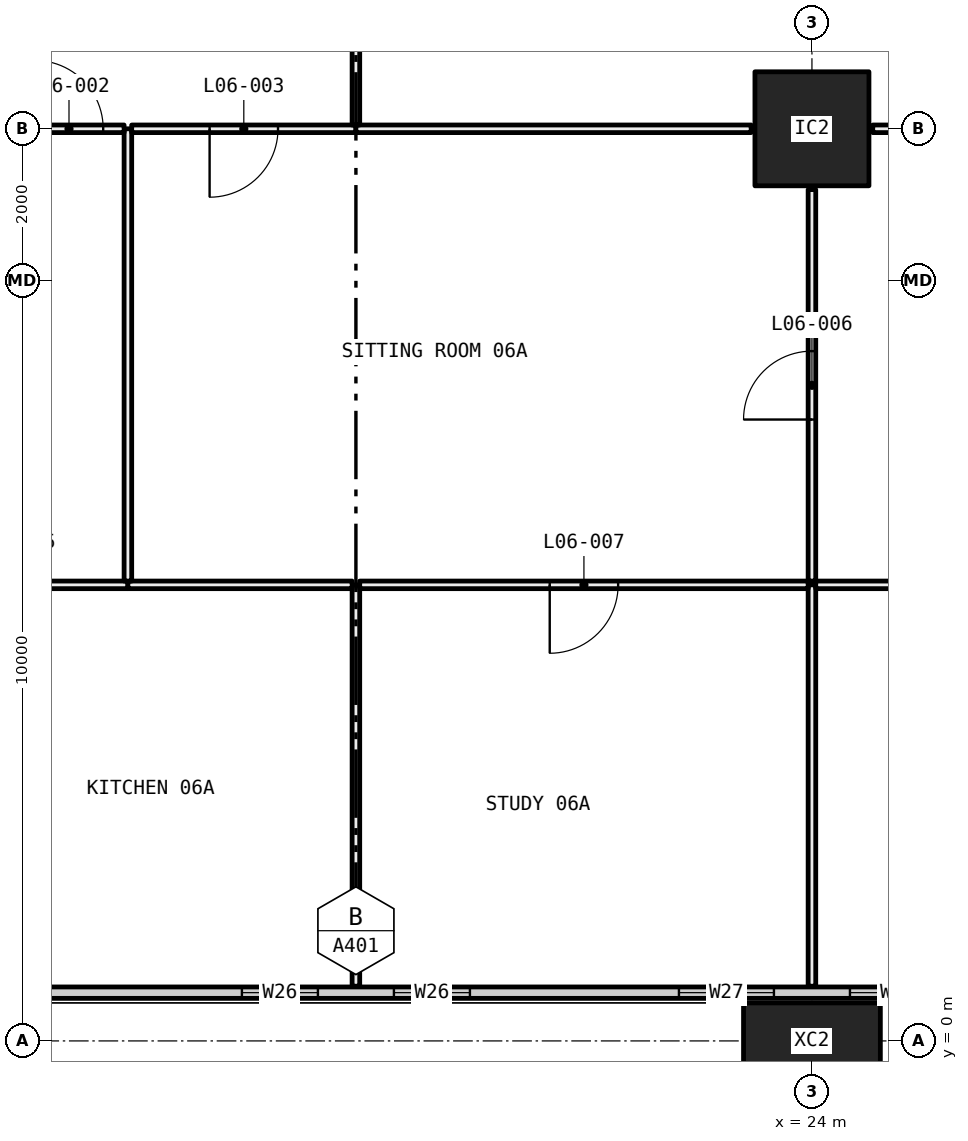
"""IFC4 building model, lengths in metres.
Left out: names, types, materials, properties, quantities, classifications, styles, units other than length and angle.
Written with IfcOpenShell. Run it as: python <this file> out.ifc"""

import sys

from ifc_helpers import new_model, si_unit, direction, frame, frame_2d, origin, origin_2d, place, context, subcontext, project, spatial, rectangle, hollow_rectangle, extrude, element, fill, save


model = new_model("IFC4")
c1 = context("Model", 3, precision=1e-05, world=origin(), true_north=direction((0.0, 1.0)))
c2 = subcontext(c1, "Body", "Model", "MODEL_VIEW")
j1 = project(units=[si_unit("LENGTHUNIT", "METRE"), si_unit("PLANEANGLEUNIT", "RADIAN")], contexts=[c1])
p1 = place(None, origin())
s1 = spatial("IfcSite", under=j1, at=p1, CompositionType="ELEMENT")
p2 = place(p1, origin())
s2 = spatial("IfcBuilding", under=s1, at=p2, CompositionType="ELEMENT")
p3 = place(p2, frame((0.0, 0.0, 33.45)))
s3 = spatial("IfcBuildingStorey", under=s2, at=p3, CompositionType="ELEMENT", Elevation=33.45)
p4 = place(p3, frame((24.0, 0.0, -0.4), z_axis=(0.0, 0.0, 1.0), x_axis=(1.0, 0.0, 0.0)))
e1 = element("IfcColumn", 1, at=p4, inside=s3, PredefinedType="COLUMN", context=c2, shape_type="SweptSolid", body=[
    extrude(hollow_rectangle(XDim=1.8, YDim=1.0, WallThickness=0.07, at=origin_2d()), origin(), (0.0, 0.0, 1.0), 3.45),
])
p5 = place(p3, frame((24.0, 12.0, 0.0), z_axis=(0.0, 0.0, 1.0), x_axis=(1.0, 0.0, 0.0)))
e2 = element("IfcColumn", 2, at=p5, inside=s3, PredefinedType="COLUMN", context=c2, shape_type="SweptSolid", body=[
    extrude(hollow_rectangle(XDim=1.5, YDim=1.5, WallThickness=0.065, at=origin_2d()), origin(), (0.0, 0.0, 1.0), 3.05),
])
p6 = place(p3, frame((6.56, 0.635, 0.0), z_axis=(0.0, 0.0, 1.0), x_axis=(1.0, 0.0, 0.0)))
e3 = element("IfcWall", 3, at=p6, inside=s3, PredefinedType="ELEMENTEDWALL", context=c2, shape_type="SweptSolid", body=[
    extrude(rectangle(XDim=58.88, YDim=0.15, at=frame_2d((29.44, 0.0))), origin(), (0.0, 0.0, 1.0), 3.05),
])
p7 = place(p6, frame((0.44, 0.0, 0.45)))
e4 = element("IfcOpeningElement", 4, at=p7, cuts=e3, PredefinedType="OPENING", context=c2, shape_type="SweptSolid", body=[
    extrude(rectangle(XDim=4.5, YDim=2.55, at=frame_2d((2.25, 1.275))), frame((0.0, 0.085, 0.0), z_axis=(0.0, -1.0, 0.0), x_axis=(1.0, 0.0, 0.0)), (0.0, 0.0, 1.0), 0.17),
])
p8 = place(p6, frame((5.94, 0.0, 0.45)))
e5 = element("IfcOpeningElement", 5, at=p8, cuts=e3, PredefinedType="OPENING", context=c2, shape_type="SweptSolid", body=[
    extrude(rectangle(XDim=1.25, YDim=2.55, at=frame_2d((0.625, 1.275))), frame((0.0, 0.085, 0.0), z_axis=(0.0, -1.0, 0.0), x_axis=(1.0, 0.0, 0.0)), (0.0, 0.0, 1.0), 0.17),
])
p9 = place(p6, frame((9.94, 0.0, 0.45)))
e6 = element("IfcOpeningElement", 6, at=p9, cuts=e3, PredefinedType="OPENING", context=c2, shape_type="SweptSolid", body=[
    extrude(rectangle(XDim=1.0, YDim=2.55, at=frame_2d((0.5, 1.275))), frame((0.0, 0.085, 0.0), z_axis=(0.0, -1.0, 0.0), x_axis=(1.0, 0.0, 0.0)), (0.0, 0.0, 1.0), 0.17),
])
p10 = place(p6, frame((11.94, 0.0, 0.45)))
e7 = element("IfcOpeningElement", 7, at=p10, cuts=e3, PredefinedType="OPENING", context=c2, shape_type="SweptSolid", body=[
    extrude(rectangle(XDim=1.0, YDim=2.55, at=frame_2d((0.5, 1.275))), frame((0.0, 0.085, 0.0), z_axis=(0.0, -1.0, 0.0), x_axis=(1.0, 0.0, 0.0)), (0.0, 0.0, 1.0), 0.17),
])
p11 = place(p6, frame((15.69, 0.0, 0.45)))
e8 = element("IfcOpeningElement", 8, at=p11, cuts=e3, PredefinedType="OPENING", context=c2, shape_type="SweptSolid", body=[
    extrude(rectangle(XDim=1.25, YDim=2.55, at=frame_2d((0.625, 1.275))), frame((0.0, 0.085, 0.0), z_axis=(0.0, -1.0, 0.0), x_axis=(1.0, 0.0, 0.0)), (0.0, 0.0, 1.0), 0.17),
])
p12 = place(p6, frame((17.94, 0.0, 0.45)))
e9 = element("IfcOpeningElement", 9, at=p12, cuts=e3, PredefinedType="OPENING", context=c2, shape_type="SweptSolid", body=[
    extrude(rectangle(XDim=1.25, YDim=2.55, at=frame_2d((0.625, 1.275))), frame((0.0, 0.085, 0.0), z_axis=(0.0, -1.0, 0.0), x_axis=(1.0, 0.0, 0.0)), (0.0, 0.0, 1.0), 0.17),
])
p13 = place(p6, frame((21.94, 0.0, 0.45)))
e10 = element("IfcOpeningElement", 10, at=p13, cuts=e3, PredefinedType="OPENING", context=c2, shape_type="SweptSolid", body=[
    extrude(rectangle(XDim=1.0, YDim=2.55, at=frame_2d((0.5, 1.275))), frame((0.0, 0.085, 0.0), z_axis=(0.0, -1.0, 0.0), x_axis=(1.0, 0.0, 0.0)), (0.0, 0.0, 1.0), 0.17),
])
p14 = place(p6, frame((23.94, 0.0, 0.45)))
e11 = element("IfcOpeningElement", 11, at=p14, cuts=e3, PredefinedType="OPENING", context=c2, shape_type="SweptSolid", body=[
    extrude(rectangle(XDim=1.0, YDim=2.55, at=frame_2d((0.5, 1.275))), frame((0.0, 0.085, 0.0), z_axis=(0.0, -1.0, 0.0), x_axis=(1.0, 0.0, 0.0)), (0.0, 0.0, 1.0), 0.17),
])
p15 = place(p6, frame((27.69, 0.0, 0.45)))
e12 = element("IfcOpeningElement", 12, at=p15, cuts=e3, PredefinedType="OPENING", context=c2, shape_type="SweptSolid", body=[
    extrude(rectangle(XDim=1.25, YDim=2.55, at=frame_2d((0.625, 1.275))), frame((0.0, 0.085, 0.0), z_axis=(0.0, -1.0, 0.0), x_axis=(1.0, 0.0, 0.0)), (0.0, 0.0, 1.0), 0.17),
])
p16 = place(p6, frame((29.94, 0.0, 0.45)))
e13 = element("IfcOpeningElement", 13, at=p16, cuts=e3, PredefinedType="OPENING", context=c2, shape_type="SweptSolid", body=[
    extrude(rectangle(XDim=1.25, YDim=2.55, at=frame_2d((0.625, 1.275))), frame((0.0, 0.085, 0.0), z_axis=(0.0, -1.0, 0.0), x_axis=(1.0, 0.0, 0.0)), (0.0, 0.0, 1.0), 0.17),
])
p17 = place(p6, frame((33.94, 0.0, 0.45)))
e14 = element("IfcOpeningElement", 14, at=p17, cuts=e3, PredefinedType="OPENING", context=c2, shape_type="SweptSolid", body=[
    extrude(rectangle(XDim=1.0, YDim=2.55, at=frame_2d((0.5, 1.275))), frame((0.0, 0.085, 0.0), z_axis=(0.0, -1.0, 0.0), x_axis=(1.0, 0.0, 0.0)), (0.0, 0.0, 1.0), 0.17),
])
p18 = place(p6, frame((35.94, 0.0, 0.45)))
e15 = element("IfcOpeningElement", 15, at=p18, cuts=e3, PredefinedType="OPENING", context=c2, shape_type="SweptSolid", body=[
    extrude(rectangle(XDim=1.0, YDim=2.55, at=frame_2d((0.5, 1.275))), frame((0.0, 0.085, 0.0), z_axis=(0.0, -1.0, 0.0), x_axis=(1.0, 0.0, 0.0)), (0.0, 0.0, 1.0), 0.17),
])
p19 = place(p6, frame((39.69, 0.0, 0.45)))
e16 = element("IfcOpeningElement", 16, at=p19, cuts=e3, PredefinedType="OPENING", context=c2, shape_type="SweptSolid", body=[
    extrude(rectangle(XDim=1.25, YDim=2.55, at=frame_2d((0.625, 1.275))), frame((0.0, 0.085, 0.0), z_axis=(0.0, -1.0, 0.0), x_axis=(1.0, 0.0, 0.0)), (0.0, 0.0, 1.0), 0.17),
])
p20 = place(p6, frame((41.94, 0.0, 0.45)))
e17 = element("IfcOpeningElement", 17, at=p20, cuts=e3, PredefinedType="OPENING", context=c2, shape_type="SweptSolid", body=[
    extrude(rectangle(XDim=1.25, YDim=2.55, at=frame_2d((0.625, 1.275))), frame((0.0, 0.085, 0.0), z_axis=(0.0, -1.0, 0.0), x_axis=(1.0, 0.0, 0.0)), (0.0, 0.0, 1.0), 0.17),
])
p21 = place(p6, frame((45.94, 0.0, 0.45)))
e18 = element("IfcOpeningElement", 18, at=p21, cuts=e3, PredefinedType="OPENING", context=c2, shape_type="SweptSolid", body=[
    extrude(rectangle(XDim=1.0, YDim=2.55, at=frame_2d((0.5, 1.275))), frame((0.0, 0.085, 0.0), z_axis=(0.0, -1.0, 0.0), x_axis=(1.0, 0.0, 0.0)), (0.0, 0.0, 1.0), 0.17),
])
p22 = place(p6, frame((47.94, 0.0, 0.45)))
e19 = element("IfcOpeningElement", 19, at=p22, cuts=e3, PredefinedType="OPENING", context=c2, shape_type="SweptSolid", body=[
    extrude(rectangle(XDim=1.0, YDim=2.55, at=frame_2d((0.5, 1.275))), frame((0.0, 0.085, 0.0), z_axis=(0.0, -1.0, 0.0), x_axis=(1.0, 0.0, 0.0)), (0.0, 0.0, 1.0), 0.17),
])
p23 = place(p6, frame((51.69, 0.0, 0.45)))
e20 = element("IfcOpeningElement", 20, at=p23, cuts=e3, PredefinedType="OPENING", context=c2, shape_type="SweptSolid", body=[
    extrude(rectangle(XDim=1.25, YDim=2.55, at=frame_2d((0.625, 1.275))), frame((0.0, 0.085, 0.0), z_axis=(0.0, -1.0, 0.0), x_axis=(1.0, 0.0, 0.0)), (0.0, 0.0, 1.0), 0.17),
])
p24 = place(p6, frame((53.94, 0.0, 0.45)))
e21 = element("IfcOpeningElement", 21, at=p24, cuts=e3, PredefinedType="OPENING", context=c2, shape_type="SweptSolid", body=[
    extrude(rectangle(XDim=4.5, YDim=2.55, at=frame_2d((2.25, 1.275))), frame((0.0, 0.085, 0.0), z_axis=(0.0, -1.0, 0.0), x_axis=(1.0, 0.0, 0.0)), (0.0, 0.0, 1.0), 0.17),
])
p25 = place(p3, frame((18.0, 0.72, 0.0), z_axis=(0.0, 0.0, 1.0), x_axis=(0.0, 1.0, 0.0)))
e22 = element("IfcWall", 22, at=p25, inside=s3, PredefinedType="PARTITIONING", context=c2, shape_type="SweptSolid", body=[
    extrude(rectangle(XDim=5.28, YDim=0.1, at=frame_2d((2.64, 0.0))), origin(), (0.0, 0.0, 1.0), 3.05),
])
p26 = place(p3, frame((15.0, 6.0, 0.0), z_axis=(0.0, 0.0, 1.0), x_axis=(-1.0, 0.0, 0.0)))
e23 = element("IfcWall", 23, at=p26, inside=s3, PredefinedType="PARTITIONING", context=c2, shape_type="SweptSolid", body=[
    extrude(rectangle(XDim=2.95, YDim=0.1, at=frame_2d((1.475, 0.0))), origin(), (0.0, 0.0, 1.0), 2.45),
])
p27 = place(p26, frame((1.025, 0.0, 0.0)))
e24 = element("IfcOpeningElement", 24, at=p27, cuts=e23, PredefinedType="OPENING", context=c2, shape_type="SweptSolid", body=[
    extrude(rectangle(XDim=0.9, YDim=2.1, at=frame_2d((0.45, 1.05))), frame((0.0, 0.06, 0.0), z_axis=(0.0, -1.0, 0.0), x_axis=(1.0, 0.0, 0.0)), (0.0, 0.0, 1.0), 0.12),
])
p28 = place(p3, frame((17.95, 6.0, 0.0), z_axis=(0.0, 0.0, 1.0), x_axis=(-1.0, 0.0, 0.0)))
e25 = element("IfcWall", 25, at=p28, inside=s3, PredefinedType="PARTITIONING", context=c2, shape_type="SweptSolid", body=[
    extrude(rectangle(XDim=2.95, YDim=0.1, at=frame_2d((1.475, 0.0))), origin(), (0.0, 0.0, 1.0), 3.05),
])
p29 = place(p3, frame((24.0, 0.72, 0.0), z_axis=(0.0, 0.0, 1.0), x_axis=(0.0, 1.0, 0.0)))
e26 = element("IfcWall", 26, at=p29, inside=s3, PredefinedType="PARTITIONING", context=c2, shape_type="SweptSolid", body=[
    extrude(rectangle(XDim=5.28, YDim=0.1, at=frame_2d((2.64, 0.0))), origin(), (0.0, 0.0, 1.0), 2.45),
])
p30 = place(p3, frame((23.95, 6.0, 0.0), z_axis=(0.0, 0.0, 1.0), x_axis=(-1.0, 0.0, 0.0)))
e27 = element("IfcWall", 27, at=p30, inside=s3, PredefinedType="PARTITIONING", context=c2, shape_type="SweptSolid", body=[
    extrude(rectangle(XDim=5.9, YDim=0.1, at=frame_2d((2.95, 0.0))), origin(), (0.0, 0.0, 1.0), 2.45),
])
p31 = place(p30, frame((2.5, 0.0, 0.0)))
e28 = element("IfcOpeningElement", 28, at=p31, cuts=e27, PredefinedType="OPENING", context=c2, shape_type="SweptSolid", body=[
    extrude(rectangle(XDim=0.9, YDim=2.1, at=frame_2d((0.45, 1.05))), frame((0.0, 0.06, 0.0), z_axis=(0.0, -1.0, 0.0), x_axis=(1.0, 0.0, 0.0)), (0.0, 0.0, 1.0), 0.12),
])
p32 = place(p3, frame((29.95, 6.0, 0.0), z_axis=(0.0, 0.0, 1.0), x_axis=(-1.0, 0.0, 0.0)))
e29 = element("IfcWall", 29, at=p32, inside=s3, PredefinedType="PARTITIONING", context=c2, shape_type="SweptSolid", body=[
    extrude(rectangle(XDim=5.9, YDim=0.1, at=frame_2d((2.95, 0.0))), origin(), (0.0, 0.0, 1.0), 2.45),
])
p33 = place(p32, frame((2.5, 0.0, 0.0)))
e30 = element("IfcOpeningElement", 30, at=p33, cuts=e29, PredefinedType="OPENING", context=c2, shape_type="SweptSolid", body=[
    extrude(rectangle(XDim=0.9, YDim=2.1, at=frame_2d((0.45, 1.05))), frame((0.0, 0.06, 0.0), z_axis=(0.0, -1.0, 0.0), x_axis=(1.0, 0.0, 0.0)), (0.0, 0.0, 1.0), 0.12),
])
p34 = place(p3, frame((15.0, 6.05, 0.0), z_axis=(0.0, 0.0, 1.0), x_axis=(0.0, 1.0, 0.0)))
e31 = element("IfcWall", 31, at=p34, inside=s3, PredefinedType="PARTITIONING", context=c2, shape_type="SweptSolid", body=[
    extrude(rectangle(XDim=5.95, YDim=0.1, at=frame_2d((2.975, 0.0))), origin(), (0.0, 0.0, 1.0), 2.45),
])
p35 = place(p3, frame((14.95, 12.0, 0.0), z_axis=(0.0, 0.0, 1.0), x_axis=(-1.0, 0.0, 0.0)))
e32 = element("IfcWall", 32, at=p35, inside=s3, PredefinedType="PARTITIONING", context=c2, shape_type="SweptSolid", body=[
    extrude(rectangle(XDim=1.45, YDim=0.1, at=frame_2d((0.725, 0.0))), origin(), (0.0, 0.0, 1.0), 2.45),
])
p36 = place(p35, frame((0.275, 0.0, 0.0)))
e33 = element("IfcOpeningElement", 33, at=p36, cuts=e32, PredefinedType="OPENING", context=c2, shape_type="SweptSolid", body=[
    extrude(rectangle(XDim=0.9, YDim=2.1, at=frame_2d((0.45, 1.05))), frame((0.0, 0.06, 0.0), z_axis=(0.0, -1.0, 0.0), x_axis=(1.0, 0.0, 0.0)), (0.0, 0.0, 1.0), 0.12),
])
p37 = place(p3, frame((24.0, 6.05, 0.0), z_axis=(0.0, 0.0, 1.0), x_axis=(0.0, 1.0, 0.0)))
e34 = element("IfcWall", 34, at=p37, inside=s3, PredefinedType="PARTITIONING", context=c2, shape_type="SweptSolid", body=[
    extrude(rectangle(XDim=5.15, YDim=0.1, at=frame_2d((2.575, 0.0))), origin(), (0.0, 0.0, 1.0), 2.45),
])
p38 = place(p37, frame((2.125, 0.0, 0.0)))
e35 = element("IfcOpeningElement", 35, at=p38, cuts=e34, PredefinedType="OPENING", context=c2, shape_type="SweptSolid", body=[
    extrude(rectangle(XDim=0.9, YDim=2.1, at=frame_2d((0.45, 1.05))), frame((0.0, 0.06, 0.0), z_axis=(0.0, -1.0, 0.0), x_axis=(1.0, 0.0, 0.0)), (0.0, 0.0, 1.0), 0.12),
])
p39 = place(p3, frame((18.0, 12.0, 0.0), z_axis=(0.0, 0.0, 1.0), x_axis=(-1.0, 0.0, 0.0)))
e36 = element("IfcWall", 36, at=p39, inside=s3, PredefinedType="PARTITIONING", context=c2, shape_type="SweptSolid", body=[
    extrude(rectangle(XDim=2.95, YDim=0.1, at=frame_2d((1.475, 0.0))), origin(), (0.0, 0.0, 1.0), 2.45),
])
p40 = place(p39, frame((1.025, 0.0, 0.0)))
e37 = element("IfcOpeningElement", 37, at=p40, cuts=e36, PredefinedType="OPENING", context=c2, shape_type="SweptSolid", body=[
    extrude(rectangle(XDim=0.9, YDim=2.1, at=frame_2d((0.45, 1.05))), frame((0.0, 0.06, 0.0), z_axis=(0.0, -1.0, 0.0), x_axis=(1.0, 0.0, 0.0)), (0.0, 0.0, 1.0), 0.12),
])
p41 = place(p3, frame((23.2, 12.0, 0.0), z_axis=(0.0, 0.0, 1.0), x_axis=(-1.0, 0.0, 0.0)))
e38 = element("IfcWall", 38, at=p41, inside=s3, PredefinedType="PARTITIONING", context=c2, shape_type="SweptSolid", body=[
    extrude(rectangle(XDim=5.2, YDim=0.1, at=frame_2d((2.6, 0.0))), origin(), (0.0, 0.0, 1.0), 2.45),
])
p42 = place(p3, frame((27.0, 12.0, 0.0), z_axis=(0.0, 0.0, 1.0), x_axis=(-1.0, 0.0, 0.0)))
e39 = element("IfcWall", 39, at=p42, inside=s3, PredefinedType="PARTITIONING", context=c2, shape_type="SweptSolid", body=[
    extrude(rectangle(XDim=2.2, YDim=0.1, at=frame_2d((1.1, 0.0))), origin(), (0.0, 0.0, 1.0), 2.45),
])
p43 = place(p3, frame((18.0, 12.05, 0.0), z_axis=(0.0, 0.0, 1.0), x_axis=(0.0, 1.0, 0.0)))
e40 = element("IfcWall", 40, at=p43, inside=s3, PredefinedType="PARTITIONING", context=c2, shape_type="SweptSolid", body=[
    extrude(rectangle(XDim=5.85, YDim=0.1, at=frame_2d((2.925, 0.0))), origin(), (0.0, 0.0, 1.0), 2.45),
])
p44 = place(p43, frame((2.475, 0.0, 0.0)))
e41 = element("IfcOpeningElement", 41, at=p44, cuts=e40, PredefinedType="OPENING", context=c2, shape_type="SweptSolid", body=[
    extrude(rectangle(XDim=0.9, YDim=2.1, at=frame_2d((0.45, 1.05))), frame((0.0, 0.06, 0.0), z_axis=(0.0, -1.0, 0.0), x_axis=(1.0, 0.0, 0.0)), (0.0, 0.0, 1.0), 0.12),
])
p45 = place(p9, origin())
e42 = element("IfcWindow", 42, at=p45, inside=s3, PartitioningType="SINGLE_PANEL", PredefinedType="WINDOW", context=c2, shape_type="SweptSolid", body=[
    extrude(rectangle(XDim=1.0, YDim=2.55, at=frame_2d((0.5, 1.275))), frame((0.0, 0.03, 0.0), z_axis=(0.0, -1.0, 0.0), x_axis=(1.0, 0.0, 0.0)), (0.0, 0.0, 1.0), 0.06),
])
fill(e6, e42)
p46 = place(p10, origin())
e43 = element("IfcWindow", 43, at=p46, inside=s3, PartitioningType="SINGLE_PANEL", PredefinedType="WINDOW", context=c2, shape_type="SweptSolid", body=[
    extrude(rectangle(XDim=1.0, YDim=2.55, at=frame_2d((0.5, 1.275))), frame((0.0, 0.03, 0.0), z_axis=(0.0, -1.0, 0.0), x_axis=(1.0, 0.0, 0.0)), (0.0, 0.0, 1.0), 0.06),
])
fill(e7, e43)
p47 = place(p11, origin())
e44 = element("IfcWindow", 44, at=p47, inside=s3, PartitioningType="SINGLE_PANEL", PredefinedType="WINDOW", context=c2, shape_type="SweptSolid", body=[
    extrude(rectangle(XDim=1.25, YDim=2.55, at=frame_2d((0.625, 1.275))), frame((0.0, 0.03, 0.0), z_axis=(0.0, -1.0, 0.0), x_axis=(1.0, 0.0, 0.0)), (0.0, 0.0, 1.0), 0.06),
])
fill(e8, e44)
p48 = place(p12, origin())
e45 = element("IfcWindow", 45, at=p48, inside=s3, PartitioningType="SINGLE_PANEL", PredefinedType="WINDOW", context=c2, shape_type="SweptSolid", body=[
    extrude(rectangle(XDim=1.25, YDim=2.55, at=frame_2d((0.625, 1.275))), frame((0.0, 0.03, 0.0), z_axis=(0.0, -1.0, 0.0), x_axis=(1.0, 0.0, 0.0)), (0.0, 0.0, 1.0), 0.06),
])
fill(e9, e45)
p49 = place(p36, frame((0.9, 0.0, 0.0), x_axis=(-1.0, 0.0, 0.0)))
e46 = element("IfcDoor", 46, at=p49, inside=s3, OperationType="SINGLE_SWING_RIGHT", PredefinedType="DOOR", context=c2, shape_type="SweptSolid", body=[
    extrude(rectangle(XDim=0.9, YDim=2.1, at=frame_2d((0.45, 1.05))), frame((0.0, 0.025, 0.0), z_axis=(0.0, -1.0, 0.0), x_axis=(1.0, 0.0, 0.0)), (0.0, 0.0, 1.0), 0.05),
])
fill(e33, e46)
p50 = place(p40, origin())
e47 = element("IfcDoor", 47, at=p50, inside=s3, OperationType="SINGLE_SWING_LEFT", PredefinedType="DOOR", context=c2, shape_type="SweptSolid", body=[
    extrude(rectangle(XDim=0.9, YDim=2.1, at=frame_2d((0.45, 1.05))), frame((0.0, 0.025, 0.0), z_axis=(0.0, -1.0, 0.0), x_axis=(1.0, 0.0, 0.0)), (0.0, 0.0, 1.0), 0.05),
])
fill(e37, e47)
p51 = place(p38, origin())
e48 = element("IfcDoor", 48, at=p51, inside=s3, OperationType="SINGLE_SWING_RIGHT", PredefinedType="DOOR", context=c2, shape_type="SweptSolid", body=[
    extrude(rectangle(XDim=0.9, YDim=2.1, at=frame_2d((0.45, 1.05))), frame((0.0, 0.025, 0.0), z_axis=(0.0, -1.0, 0.0), x_axis=(1.0, 0.0, 0.0)), (0.0, 0.0, 1.0), 0.05),
])
fill(e35, e48)
p52 = place(p31, origin())
e49 = element("IfcDoor", 49, at=p52, inside=s3, OperationType="SINGLE_SWING_LEFT", PredefinedType="DOOR", context=c2, shape_type="SweptSolid", body=[
    extrude(rectangle(XDim=0.9, YDim=2.1, at=frame_2d((0.45, 1.05))), frame((0.0, 0.025, 0.0), z_axis=(0.0, -1.0, 0.0), x_axis=(1.0, 0.0, 0.0)), (0.0, 0.0, 1.0), 0.05),
])
fill(e28, e49)
save(model, sys.argv[1])
